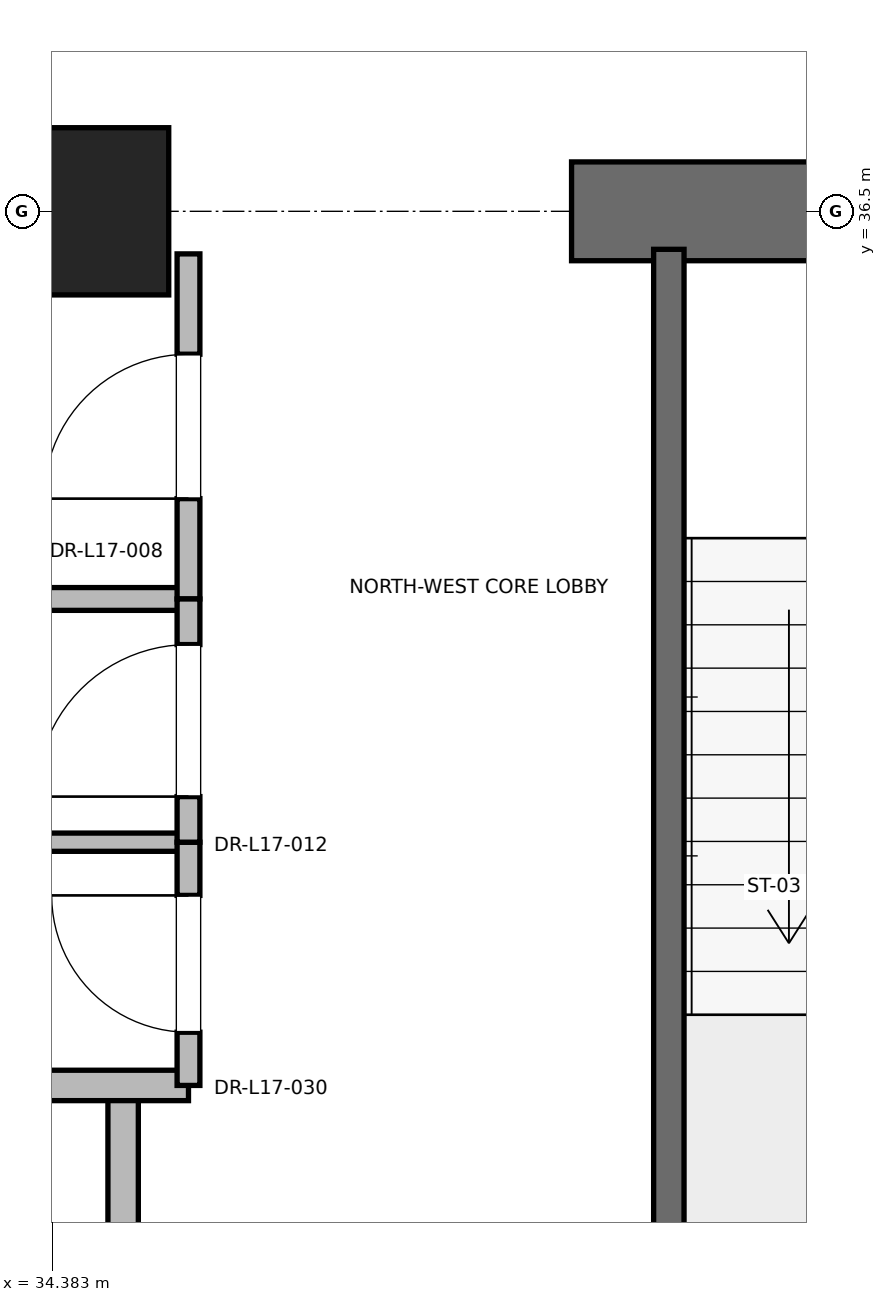
"""IFC4 building model, lengths in metres.
Left out: names, types, materials, properties, quantities, classifications, styles, units other than length and angle.
Written with IfcOpenShell. Run it as: python <this file> out.ifc"""

import sys

from ifc_helpers import new_model, si_unit, direction, frame, frame_2d, origin, origin_2d, place, context, subcontext, project, spatial, rectangle, extrude, element, fill, save


model = new_model("IFC4")
c1 = context("Model", 3, precision=1e-05, world=origin(), true_north=direction((0.0, 1.0)))
c2 = subcontext(c1, "Body", "Model", "MODEL_VIEW")
j1 = project(units=[si_unit("LENGTHUNIT", "METRE"), si_unit("PLANEANGLEUNIT", "RADIAN")], contexts=[c1])
p1 = place(None, origin())
s1 = spatial("IfcSite", under=j1, at=p1, CompositionType="ELEMENT")
p2 = place(p1, origin())
s2 = spatial("IfcBuilding", under=s1, at=p2, CompositionType="ELEMENT")
p3 = place(p2, frame((0.0, 0.0, 75.6)))
s3 = spatial("IfcBuildingStorey", under=s2, at=p3, CompositionType="ELEMENT", Elevation=75.6)
p4 = place(p3, frame((34.6, 36.5, 0.0), z_axis=(0.0, 0.0, 1.0), x_axis=(1.0, 0.0, 0.0)))
e1 = element("IfcColumn", 1, at=p4, inside=s3, PredefinedType="PILASTER", context=c2, shape_type="SweptSolid", body=[
    extrude(rectangle(XDim=1.1, YDim=1.1, at=origin_2d()), origin(), (0.0, 0.0, 1.0), 4.0),
])
p5 = place(p3, frame((29.0, 36.5, 0.0), z_axis=(0.0, 0.0, 1.0), x_axis=(1.0, 0.0, 0.0)))
e2 = element("IfcWall", 2, at=p5, inside=s3, PredefinedType="SHEAR", context=c2, shape_type="SweptSolid", body=[
    extrude(rectangle(XDim=5.8, YDim=0.65, at=frame_2d((2.9, 0.0))), origin(), (0.0, 0.0, 1.0), 3.76),
])
p6 = place(p3, frame((37.8, 36.5, 0.0), z_axis=(0.0, 0.0, 1.0), x_axis=(1.0, 0.0, 0.0)))
e3 = element("IfcWall", 3, at=p6, inside=s3, PredefinedType="SHEAR", context=c2, shape_type="SweptSolid", body=[
    extrude(rectangle(XDim=4.4, YDim=0.65, at=frame_2d((2.2, 0.0))), origin(), (0.0, 0.0, 1.0), 3.76),
])
p7 = place(p6, frame((1.65, 0.0, 0.0)))
e4 = element("IfcOpeningElement", 4, at=p7, cuts=e3, PredefinedType="OPENING", context=c2, shape_type="SweptSolid", body=[
    extrude(rectangle(XDim=1.1, YDim=2.15, at=frame_2d((0.55, 1.075))), frame((0.0, 0.325, 0.0), z_axis=(0.0, -1.0, 0.0), x_axis=(1.0, 0.0, 0.0)), (0.0, 0.0, 1.0), 0.65),
])
p8 = place(p3, frame((38.44, 27.38, 0.0), z_axis=(0.0, 0.0, 1.0), x_axis=(0.0, 1.0, 0.0)))
e5 = element("IfcWall", 5, at=p8, inside=s3, PredefinedType="SOLIDWALL", context=c2, shape_type="SweptSolid", body=[
    extrude(rectangle(XDim=8.87, YDim=0.2, at=frame_2d((4.435, 0.0))), origin(), (0.0, 0.0, 1.0), 3.76),
])
p9 = place(p3, frame((34.85, 27.38, 0.0), z_axis=(0.0, 0.0, 1.0), x_axis=(0.0, 1.0, 0.0)))
e6 = element("IfcWall", 6, at=p9, inside=s3, PredefinedType="PARTITIONING", context=c2, shape_type="SweptSolid", body=[
    extrude(rectangle(XDim=3.37, YDim=0.2, at=frame_2d((1.685, 0.0))), origin(), (0.0, 0.0, 1.0), 3.76),
])
p10 = place(p9, frame((1.11, 0.0, 0.0)))
e7 = element("IfcOpeningElement", 7, at=p10, cuts=e6, PredefinedType="OPENING", context=c2, shape_type="SweptSolid", body=[
    extrude(rectangle(XDim=1.15, YDim=2.2, at=frame_2d((0.575, 1.1))), frame((0.0, 0.1, 0.0), z_axis=(0.0, -1.0, 0.0), x_axis=(1.0, 0.0, 0.0)), (0.0, 0.0, 1.0), 0.2),
])
p11 = place(p3, frame((32.15, 30.75, 0.0), z_axis=(0.0, 0.0, 1.0), x_axis=(1.0, 0.0, 0.0)))
e8 = element("IfcWall", 8, at=p11, inside=s3, PredefinedType="PARTITIONING", context=c2, shape_type="SweptSolid", body=[
    extrude(rectangle(XDim=3.13, YDim=0.2, at=frame_2d((1.565, 0.0))), origin(), (0.0, 0.0, 1.0), 3.76),
])
p12 = place(p3, frame((32.15, 33.95, 0.0), z_axis=(0.0, 0.0, 1.0), x_axis=(1.0, 0.0, 0.0)))
e9 = element("IfcWall", 9, at=p12, inside=s3, PredefinedType="PARTITIONING", context=c2, shape_type="SweptSolid", body=[
    extrude(rectangle(XDim=3.13, YDim=0.15, at=frame_2d((1.565, 0.0))), origin(), (0.0, 0.0, 1.0), 2.85),
])
p13 = place(p3, frame((35.28, 33.95, 0.0), z_axis=(0.0, 0.0, 1.0), x_axis=(0.0, 1.0, 0.0)))
e10 = element("IfcWall", 10, at=p13, inside=s3, PredefinedType="PARTITIONING", context=c2, shape_type="SweptSolid", body=[
    extrude(rectangle(XDim=2.27, YDim=0.15, at=frame_2d((1.135, 0.0))), origin(), (0.0, 0.0, 1.0), 2.54),
])
p14 = place(p13, frame((0.66, 0.0, 0.0)))
e11 = element("IfcOpeningElement", 11, at=p14, cuts=e10, PredefinedType="OPENING", context=c2, shape_type="SweptSolid", body=[
    extrude(rectangle(XDim=0.95, YDim=2.15, at=frame_2d((0.475, 1.075))), frame((0.0, 0.075, 0.0), z_axis=(0.0, -1.0, 0.0), x_axis=(1.0, 0.0, 0.0)), (0.0, 0.0, 1.0), 0.15),
])
p15 = place(p3, frame((32.15, 32.35, 0.0), z_axis=(0.0, 0.0, 1.0), x_axis=(1.0, 0.0, 0.0)))
e12 = element("IfcWall", 12, at=p15, inside=s3, PredefinedType="PARTITIONING", context=c2, shape_type="SweptSolid", body=[
    extrude(rectangle(XDim=3.13, YDim=0.12, at=frame_2d((1.565, 0.0))), origin(), (0.0, 0.0, 1.0), 2.85),
])
p16 = place(p3, frame((35.28, 30.75, 0.0), z_axis=(0.0, 0.0, 1.0), x_axis=(0.0, 1.0, 0.0)))
e13 = element("IfcWall", 13, at=p16, inside=s3, PredefinedType="PARTITIONING", context=c2, shape_type="SweptSolid", body=[
    extrude(rectangle(XDim=1.6, YDim=0.15, at=frame_2d((0.8, 0.0))), origin(), (0.0, 0.0, 1.0), 2.85),
])
p17 = place(p16, frame((0.35, 0.0, 0.0)))
e14 = element("IfcOpeningElement", 14, at=p17, cuts=e13, PredefinedType="OPENING", context=c2, shape_type="SweptSolid", body=[
    extrude(rectangle(XDim=0.9, YDim=2.1, at=frame_2d((0.45, 1.05))), frame((0.0, 0.075, 0.0), z_axis=(0.0, -1.0, 0.0), x_axis=(1.0, 0.0, 0.0)), (0.0, 0.0, 1.0), 0.15),
])
p18 = place(p3, frame((35.28, 32.35, 0.0), z_axis=(0.0, 0.0, 1.0), x_axis=(0.0, 1.0, 0.0)))
e15 = element("IfcWall", 15, at=p18, inside=s3, PredefinedType="PARTITIONING", context=c2, shape_type="SweptSolid", body=[
    extrude(rectangle(XDim=1.6, YDim=0.15, at=frame_2d((0.8, 0.0))), origin(), (0.0, 0.0, 1.0), 2.85),
])
p19 = place(p18, frame((0.3, 0.0, 0.0)))
e16 = element("IfcOpeningElement", 16, at=p19, cuts=e15, PredefinedType="OPENING", context=c2, shape_type="SweptSolid", body=[
    extrude(rectangle(XDim=1.0, YDim=2.15, at=frame_2d((0.5, 1.075))), frame((0.0, 0.075, 0.0), z_axis=(0.0, -1.0, 0.0), x_axis=(1.0, 0.0, 0.0)), (0.0, 0.0, 1.0), 0.15),
])
p20 = place(p14, origin())
e17 = element("IfcDoor", 17, at=p20, inside=s3, OperationType="SINGLE_SWING_LEFT", PredefinedType="DOOR", context=c2, shape_type="SweptSolid", body=[
    extrude(rectangle(XDim=0.95, YDim=2.15, at=frame_2d((0.475, 1.075))), frame((0.0, 0.025, 0.0), z_axis=(0.0, -1.0, 0.0), x_axis=(1.0, 0.0, 0.0)), (0.0, 0.0, 1.0), 0.05),
])
fill(e11, e17)
p21 = place(p17, origin())
e18 = element("IfcDoor", 18, at=p21, inside=s3, OperationType="SINGLE_SWING_RIGHT", PredefinedType="DOOR", context=c2, shape_type="SweptSolid", body=[
    extrude(rectangle(XDim=0.9, YDim=2.1, at=frame_2d((0.45, 1.05))), frame((0.0, 0.025, 0.0), z_axis=(0.0, -1.0, 0.0), x_axis=(1.0, 0.0, 0.0)), (0.0, 0.0, 1.0), 0.05),
])
fill(e14, e18)
p22 = place(p19, origin())
e19 = element("IfcDoor", 19, at=p22, inside=s3, OperationType="SINGLE_SWING_LEFT", PredefinedType="DOOR", context=c2, shape_type="SweptSolid", body=[
    extrude(rectangle(XDim=1.0, YDim=2.15, at=frame_2d((0.5, 1.075))), frame((0.0, 0.025, 0.0), z_axis=(0.0, -1.0, 0.0), x_axis=(1.0, 0.0, 0.0)), (0.0, 0.0, 1.0), 0.05),
])
fill(e16, e19)
save(model, sys.argv[1])
